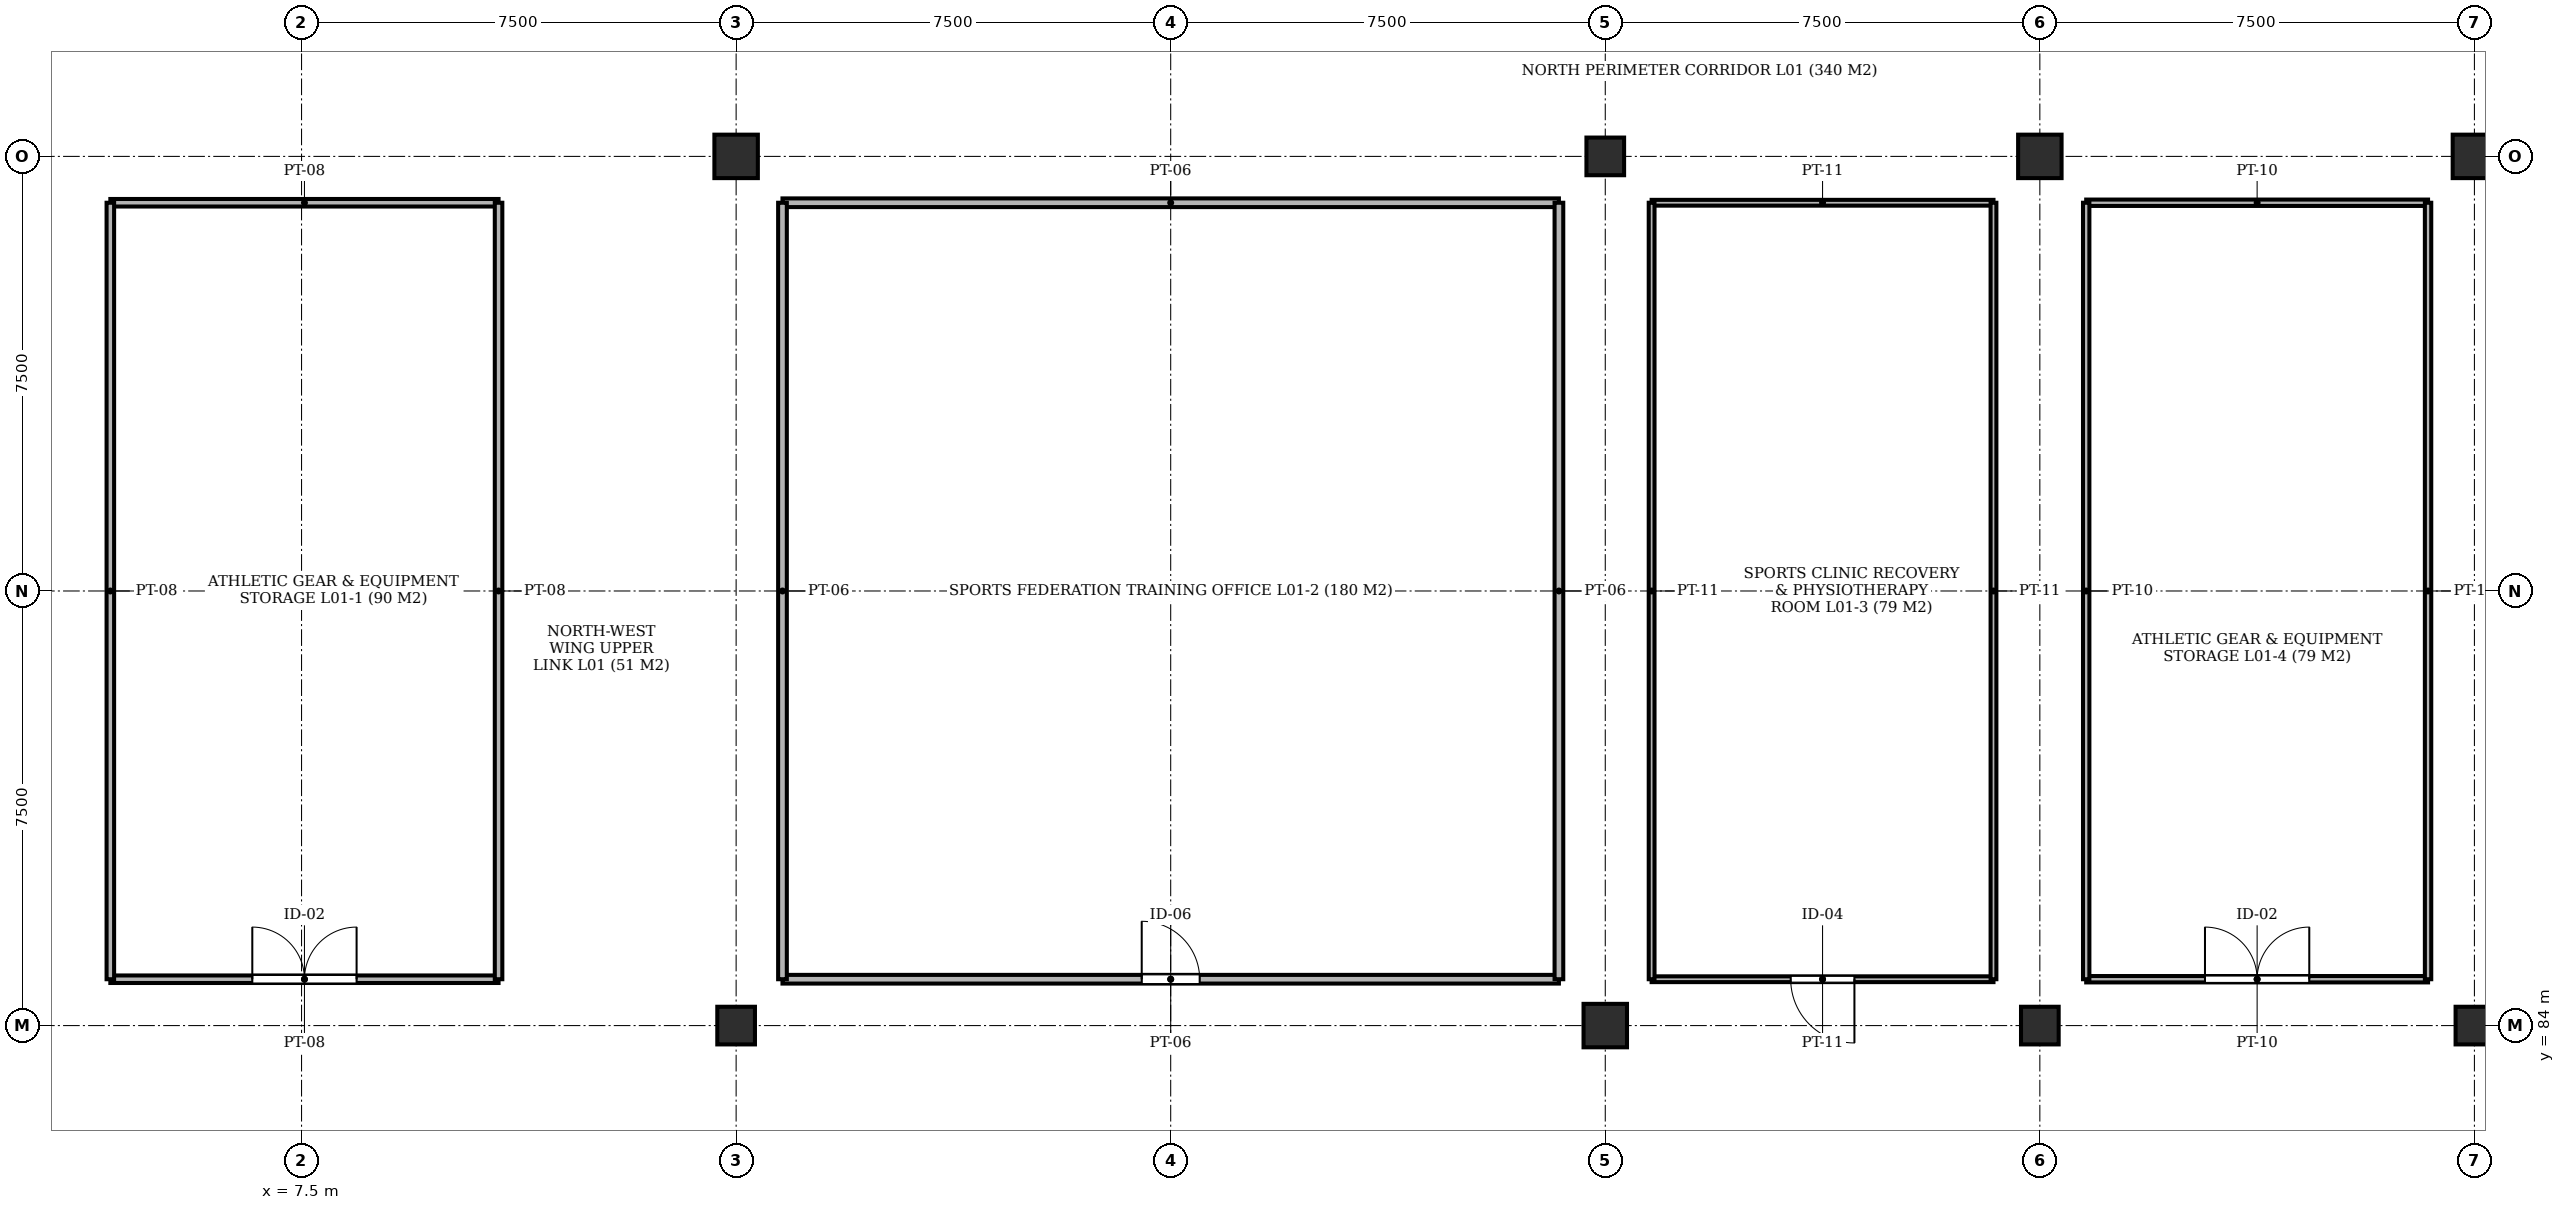
"""IFC4 building model, lengths in metres.
Left out: names, types, materials, properties, quantities, classifications, styles, units other than length and angle.
Written with IfcOpenShell. Run it as: python <this file> out.ifc"""

import sys

from ifc_helpers import new_model, si_unit, direction, frame, frame_2d, origin, origin_2d, place, context, subcontext, project, spatial, rectangle, extrude, element, fill, save


model = new_model("IFC4")
c1 = context("Model", 3, precision=1e-05, world=origin(), true_north=direction((0.0, 1.0)))
c2 = subcontext(c1, "Body", "Model", "MODEL_VIEW")
j1 = project(units=[si_unit("LENGTHUNIT", "METRE"), si_unit("PLANEANGLEUNIT", "RADIAN")], contexts=[c1])
p1 = place(None, origin())
s1 = spatial("IfcSite", under=j1, at=p1, CompositionType="ELEMENT")
p2 = place(p1, origin())
s2 = spatial("IfcBuilding", under=s1, at=p2, CompositionType="ELEMENT")
p3 = place(p2, frame((0.0, 0.0, 4.6)))
s3 = spatial("IfcBuildingStorey", under=s2, at=p3, CompositionType="ELEMENT", Elevation=4.6)
p4 = place(p3, frame((15.0, 84.0, -0.3), z_axis=(0.0, 0.0, 1.0), x_axis=(1.0, 0.0, 0.0)))
e1 = element("IfcColumn", 1, at=p4, inside=s3, PredefinedType="COLUMN", context=c2, shape_type="SweptSolid", body=[
    extrude(rectangle(XDim=0.65, YDim=0.65, at=origin_2d()), origin(), (0.0, 0.0, 1.0), 4.65),
])
for number, where, z_axis, x_axis in (
    (2, (15.0, 99.0, -0.3), (0.0, 0.0, 1.0), (1.0, 0.0, 0.0)),
    (3, (30.0, 84.0, -0.3), (0.0, 0.0, 1.0), (1.0, 0.0, 0.0)),
):
    element("IfcColumn", number, at=place(p3, frame(where, z_axis=z_axis, x_axis=x_axis)), inside=s3, PredefinedType="COLUMN", context=c2, shape_type="SweptSolid", body=[
        extrude(rectangle(XDim=0.75, YDim=0.75, at=origin_2d()), origin(), (0.0, 0.0, 1.0), 4.65),
    ])
for number, where, z_axis, x_axis in (
    (4, (30.0, 99.0, -0.3), (0.0, 0.0, 1.0), (1.0, 0.0, 0.0)),
    (5, (37.5, 84.0, -0.3), (0.0, 0.0, 1.0), (1.0, 0.0, 0.0)),
):
    element("IfcColumn", number, at=place(p3, frame(where, z_axis=z_axis, x_axis=x_axis)), inside=s3, PredefinedType="COLUMN", context=c2, shape_type="SweptSolid", body=[
        extrude(rectangle(XDim=0.65, YDim=0.65, at=origin_2d()), origin(), (0.0, 0.0, 1.0), 4.65),
    ])
p5 = place(p3, frame((37.5, 99.0, -0.3), z_axis=(0.0, 0.0, 1.0), x_axis=(1.0, 0.0, 0.0)))
e6 = element("IfcColumn", 6, at=p5, inside=s3, PredefinedType="COLUMN", context=c2, shape_type="SweptSolid", body=[
    extrude(rectangle(XDim=0.75, YDim=0.75, at=origin_2d()), origin(), (0.0, 0.0, 1.0), 4.65),
])
p6 = place(p3, frame((45.0, 84.0, -0.3), z_axis=(0.0, 0.0, 1.0), x_axis=(1.0, 0.0, 0.0)))
e7 = element("IfcColumn", 7, at=p6, inside=s3, PredefinedType="COLUMN", context=c2, shape_type="SweptSolid", body=[
    extrude(rectangle(XDim=0.65, YDim=0.65, at=origin_2d()), origin(), (0.0, 0.0, 1.0), 4.65),
])
p7 = place(p3, frame((45.0, 99.0, -0.3), z_axis=(0.0, 0.0, 1.0), x_axis=(1.0, 0.0, 0.0)))
e8 = element("IfcColumn", 8, at=p7, inside=s3, PredefinedType="COLUMN", context=c2, shape_type="SweptSolid", body=[
    extrude(rectangle(XDim=0.75, YDim=0.75, at=origin_2d()), origin(), (0.0, 0.0, 1.0), 4.65),
])
p8 = place(p3, frame((4.2, 84.8, 0.0), z_axis=(0.0, 0.0, 1.0), x_axis=(1.0, 0.0, 0.0)))
e9 = element("IfcWall", 9, at=p8, inside=s3, PredefinedType="PARTITIONING", context=c2, shape_type="SweptSolid", body=[
    extrude(rectangle(XDim=6.7, YDim=0.13, at=frame_2d((3.35, 0.0))), origin(), (0.0, 0.0, 1.0), 4.08),
])
p9 = place(p8, frame((2.45, 0.0, 0.0)))
e10 = element("IfcOpeningElement", 10, at=p9, cuts=e9, PredefinedType="OPENING", context=c2, shape_type="SweptSolid", body=[
    extrude(rectangle(XDim=1.8, YDim=2.25, at=frame_2d((0.9, 1.125))), frame((0.0, 0.077, 0.0), z_axis=(0.0, -1.0, 0.0), x_axis=(1.0, 0.0, 0.0)), (0.0, 0.0, 1.0), 0.154),
])
p10 = place(p3, frame((4.2, 98.2, 0.0), z_axis=(0.0, 0.0, 1.0), x_axis=(1.0, 0.0, 0.0)))
e11 = element("IfcWall", 11, at=p10, inside=s3, PredefinedType="PARTITIONING", context=c2, shape_type="SweptSolid", body=[
    extrude(rectangle(XDim=6.7, YDim=0.13, at=frame_2d((3.35, 0.0))), origin(), (0.0, 0.0, 1.0), 4.08),
])
for number, where, z_axis, x_axis in (
    (12, (4.2, 84.8, 0.0), (0.0, 0.0, 1.0), (0.0, 1.0, 0.0)),
    (13, (10.9, 84.8, 0.0), (0.0, 0.0, 1.0), (0.0, 1.0, 0.0)),
):
    element("IfcWall", number, at=place(p3, frame(where, z_axis=z_axis, x_axis=x_axis)), inside=s3, PredefinedType="PARTITIONING", context=c2, shape_type="SweptSolid", body=[
        extrude(rectangle(XDim=13.4, YDim=0.13, at=frame_2d((6.7, 0.0))), origin(), (0.0, 0.0, 1.0), 4.08),
    ])
p11 = place(p3, frame((15.8, 84.8, 0.0), z_axis=(0.0, 0.0, 1.0), x_axis=(1.0, 0.0, 0.0)))
e14 = element("IfcWall", 14, at=p11, inside=s3, PredefinedType="PARTITIONING", context=c2, shape_type="SweptSolid", body=[
    extrude(rectangle(XDim=13.4, YDim=0.15, at=frame_2d((6.7, 0.0))), origin(), (0.0, 0.0, 1.0), 4.08),
])
p12 = place(p11, frame((6.2, 0.0, 0.0)))
e15 = element("IfcOpeningElement", 15, at=p12, cuts=e14, PredefinedType="OPENING", context=c2, shape_type="SweptSolid", body=[
    extrude(rectangle(XDim=1.0, YDim=2.15, at=frame_2d((0.5, 1.075))), frame((0.0, 0.087, 0.0), z_axis=(0.0, -1.0, 0.0), x_axis=(1.0, 0.0, 0.0)), (0.0, 0.0, 1.0), 0.174),
])
for number, where, z_axis, x_axis in (
    (16, (15.8, 98.2, 0.0), (0.0, 0.0, 1.0), (1.0, 0.0, 0.0)),
    (17, (15.8, 84.8, 0.0), (0.0, 0.0, 1.0), (0.0, 1.0, 0.0)),
    (18, (29.2, 84.8, 0.0), (0.0, 0.0, 1.0), (0.0, 1.0, 0.0)),
):
    element("IfcWall", number, at=place(p3, frame(where, z_axis=z_axis, x_axis=x_axis)), inside=s3, PredefinedType="PARTITIONING", context=c2, shape_type="SweptSolid", body=[
        extrude(rectangle(XDim=13.4, YDim=0.15, at=frame_2d((6.7, 0.0))), origin(), (0.0, 0.0, 1.0), 4.08),
    ])
p13 = place(p3, frame((30.8, 84.8, 0.0), z_axis=(0.0, 0.0, 1.0), x_axis=(1.0, 0.0, 0.0)))
e19 = element("IfcWall", 19, at=p13, inside=s3, PredefinedType="PARTITIONING", context=c2, shape_type="SweptSolid", body=[
    extrude(rectangle(XDim=5.9, YDim=0.1, at=frame_2d((2.95, 0.0))), origin(), (0.0, 0.0, 1.0), 4.08),
])
p14 = place(p13, frame((2.4, 0.0, 0.0)))
e20 = element("IfcOpeningElement", 20, at=p14, cuts=e19, PredefinedType="OPENING", context=c2, shape_type="SweptSolid", body=[
    extrude(rectangle(XDim=1.1, YDim=2.15, at=frame_2d((0.55, 1.075))), frame((0.0, 0.062, 0.0), z_axis=(0.0, -1.0, 0.0), x_axis=(1.0, 0.0, 0.0)), (0.0, 0.0, 1.0), 0.124),
])
p15 = place(p3, frame((30.8, 98.2, 0.0), z_axis=(0.0, 0.0, 1.0), x_axis=(1.0, 0.0, 0.0)))
e21 = element("IfcWall", 21, at=p15, inside=s3, PredefinedType="PARTITIONING", context=c2, shape_type="SweptSolid", body=[
    extrude(rectangle(XDim=5.9, YDim=0.1, at=frame_2d((2.95, 0.0))), origin(), (0.0, 0.0, 1.0), 4.08),
])
for number, where, z_axis, x_axis in (
    (22, (30.8, 84.8, 0.0), (0.0, 0.0, 1.0), (0.0, 1.0, 0.0)),
    (23, (36.7, 84.8, 0.0), (0.0, 0.0, 1.0), (0.0, 1.0, 0.0)),
):
    element("IfcWall", number, at=place(p3, frame(where, z_axis=z_axis, x_axis=x_axis)), inside=s3, PredefinedType="PARTITIONING", context=c2, shape_type="SweptSolid", body=[
        extrude(rectangle(XDim=13.4, YDim=0.1, at=frame_2d((6.7, 0.0))), origin(), (0.0, 0.0, 1.0), 4.08),
    ])
p16 = place(p3, frame((38.3, 84.8, 0.0), z_axis=(0.0, 0.0, 1.0), x_axis=(1.0, 0.0, 0.0)))
e24 = element("IfcWall", 24, at=p16, inside=s3, PredefinedType="PARTITIONING", context=c2, shape_type="SweptSolid", body=[
    extrude(rectangle(XDim=5.9, YDim=0.11, at=frame_2d((2.95, 0.0))), origin(), (0.0, 0.0, 1.0), 4.08),
])
p17 = place(p16, frame((2.05, 0.0, 0.0)))
e25 = element("IfcOpeningElement", 25, at=p17, cuts=e24, PredefinedType="OPENING", context=c2, shape_type="SweptSolid", body=[
    extrude(rectangle(XDim=1.8, YDim=2.25, at=frame_2d((0.9, 1.125))), frame((0.0, 0.067, 0.0), z_axis=(0.0, -1.0, 0.0), x_axis=(1.0, 0.0, 0.0)), (0.0, 0.0, 1.0), 0.134),
])
p18 = place(p3, frame((38.3, 98.2, 0.0), z_axis=(0.0, 0.0, 1.0), x_axis=(1.0, 0.0, 0.0)))
e26 = element("IfcWall", 26, at=p18, inside=s3, PredefinedType="PARTITIONING", context=c2, shape_type="SweptSolid", body=[
    extrude(rectangle(XDim=5.9, YDim=0.11, at=frame_2d((2.95, 0.0))), origin(), (0.0, 0.0, 1.0), 4.08),
])
for number, where, z_axis, x_axis in (
    (27, (38.3, 84.8, 0.0), (0.0, 0.0, 1.0), (0.0, 1.0, 0.0)),
    (28, (44.2, 84.8, 0.0), (0.0, 0.0, 1.0), (0.0, 1.0, 0.0)),
):
    element("IfcWall", number, at=place(p3, frame(where, z_axis=z_axis, x_axis=x_axis)), inside=s3, PredefinedType="PARTITIONING", context=c2, shape_type="SweptSolid", body=[
        extrude(rectangle(XDim=13.4, YDim=0.11, at=frame_2d((6.7, 0.0))), origin(), (0.0, 0.0, 1.0), 4.08),
    ])
p19 = place(p9, origin())
e29 = element("IfcDoor", 29, at=p19, inside=s3, OperationType="DOUBLE_DOOR_SINGLE_SWING", PredefinedType="DOOR", context=c2, shape_type="SweptSolid", body=[
    extrude(rectangle(XDim=1.8, YDim=2.25, at=frame_2d((0.9, 1.125))), frame((0.0, 0.025, 0.0), z_axis=(0.0, -1.0, 0.0), x_axis=(1.0, 0.0, 0.0)), (0.0, 0.0, 1.0), 0.05),
])
fill(e10, e29)
p20 = place(p12, origin())
e30 = element("IfcDoor", 30, at=p20, inside=s3, OperationType="SINGLE_SWING_LEFT", PredefinedType="DOOR", context=c2, shape_type="SweptSolid", body=[
    extrude(rectangle(XDim=1.0, YDim=2.15, at=frame_2d((0.5, 1.075))), frame((0.0, 0.025, 0.0), z_axis=(0.0, -1.0, 0.0), x_axis=(1.0, 0.0, 0.0)), (0.0, 0.0, 1.0), 0.05),
])
fill(e15, e30)
p21 = place(p14, frame((1.1, 0.0, 0.0), z_axis=(0.0, 0.0, 1.0), x_axis=(-1.0, 0.0, 0.0)))
e31 = element("IfcDoor", 31, at=p21, inside=s3, OperationType="SINGLE_SWING_RIGHT", PredefinedType="DOOR", context=c2, shape_type="SweptSolid", body=[
    extrude(rectangle(XDim=1.1, YDim=2.15, at=frame_2d((0.55, 1.075))), frame((0.0, 0.025, 0.0), z_axis=(0.0, -1.0, 0.0), x_axis=(1.0, 0.0, 0.0)), (0.0, 0.0, 1.0), 0.05),
])
fill(e20, e31)
p22 = place(p17, origin())
e32 = element("IfcDoor", 32, at=p22, inside=s3, OperationType="DOUBLE_DOOR_SINGLE_SWING", PredefinedType="DOOR", context=c2, shape_type="SweptSolid", body=[
    extrude(rectangle(XDim=1.8, YDim=2.25, at=frame_2d((0.9, 1.125))), frame((0.0, 0.025, 0.0), z_axis=(0.0, -1.0, 0.0), x_axis=(1.0, 0.0, 0.0)), (0.0, 0.0, 1.0), 0.05),
])
fill(e25, e32)
save(model, sys.argv[1])
